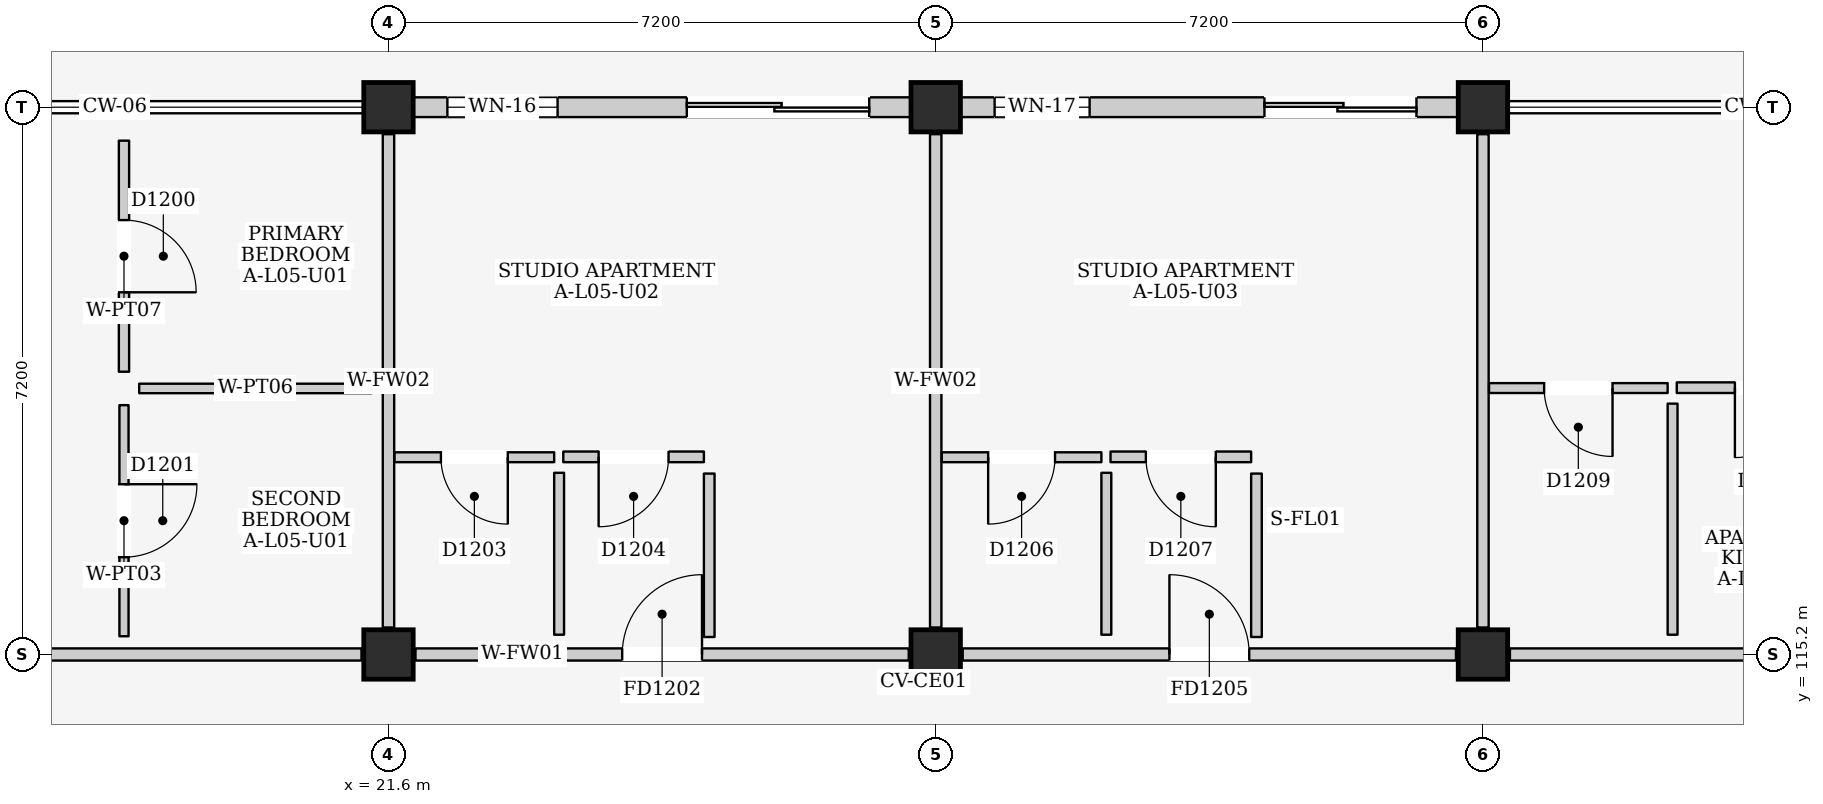
"""IFC4 building model, lengths in metres.
Left out: names, types, materials, properties, quantities, classifications, styles, units other than length and angle.
Written with IfcOpenShell. Run it as: python <this file> out.ifc"""

import sys

from ifc_helpers import new_model, si_unit, direction, frame, frame_2d, origin, origin_2d, place, context, subcontext, project, spatial, rectangle, extrude, element, fill, save


model = new_model("IFC4")
c1 = context("Model", 3, precision=1e-05, world=origin(), true_north=direction((0.0, 1.0)))
c2 = subcontext(c1, "Body", "Model", "MODEL_VIEW")
j1 = project(units=[si_unit("LENGTHUNIT", "METRE"), si_unit("PLANEANGLEUNIT", "RADIAN")], contexts=[c1])
p1 = place(None, origin())
s1 = spatial("IfcSite", under=j1, at=p1, CompositionType="ELEMENT")
p2 = place(p1, origin())
s2 = spatial("IfcBuilding", under=s1, at=p2, CompositionType="ELEMENT")
p3 = place(p2, frame((0.0, 0.0, 18.6)))
s3 = spatial("IfcBuildingStorey", under=s2, at=p3, CompositionType="ELEMENT", Elevation=18.6)
for number, where, z_axis, x_axis in (
    (1, (21.6, 115.2, 0.0), (0.0, 0.0, 1.0), (1.0, 0.0, 0.0)),
    (2, (21.6, 122.4, 0.0), (0.0, 0.0, 1.0), (1.0, 0.0, 0.0)),
    (3, (28.8, 115.2, 0.0), (0.0, 0.0, 1.0), (1.0, 0.0, 0.0)),
    (4, (28.8, 122.4, 0.0), (0.0, 0.0, 1.0), (1.0, 0.0, 0.0)),
    (5, (36.0, 115.2, 0.0), (0.0, 0.0, 1.0), (1.0, 0.0, 0.0)),
    (6, (36.0, 122.4, 0.0), (0.0, 0.0, 1.0), (1.0, 0.0, 0.0)),
):
    element("IfcColumn", number, at=place(p3, frame(where, z_axis=z_axis, x_axis=x_axis)), inside=s3, PredefinedType="COLUMN", context=c2, shape_type="SweptSolid", body=[
        extrude(rectangle(XDim=0.65, YDim=0.65, at=origin_2d()), origin(), (0.0, 0.0, 1.0), 3.3),
    ])
p4 = place(p3, frame((21.925, 122.4, 0.0), z_axis=(0.0, 0.0, 1.0), x_axis=(1.0, 0.0, 0.0)))
e7 = element("IfcWall", 7, at=p4, inside=s3, PredefinedType="ELEMENTEDWALL", context=c2, shape_type="SweptSolid", body=[
    extrude(rectangle(XDim=6.55, YDim=0.26, at=frame_2d((3.275, 0.0))), origin(), (0.0, 0.0, 1.0), 2.595),
])
p5 = place(p4, frame((3.6, 0.0, 0.0)))
e8 = element("IfcOpeningElement", 8, at=p5, cuts=e7, PredefinedType="OPENING", context=c2, shape_type="SweptSolid", body=[
    extrude(rectangle(XDim=2.4, YDim=2.12, at=frame_2d((1.2, 1.06))), frame((0.0, 0.145, 0.0), z_axis=(0.0, -1.0, 0.0), x_axis=(1.0, 0.0, 0.0)), (0.0, 0.0, 1.0), 0.29),
])
p6 = place(p4, frame((0.45, 0.0, 0.9)))
e9 = element("IfcOpeningElement", 9, at=p6, cuts=e7, PredefinedType="OPENING", context=c2, shape_type="SweptSolid", body=[
    extrude(rectangle(XDim=1.45, YDim=1.4, at=frame_2d((0.725, 0.7))), frame((0.0, 0.145, 0.0), z_axis=(0.0, -1.0, 0.0), x_axis=(1.0, 0.0, 0.0)), (0.0, 0.0, 1.0), 0.29),
])
p7 = place(p3, frame((29.125, 122.4, 0.0), z_axis=(0.0, 0.0, 1.0), x_axis=(1.0, 0.0, 0.0)))
e10 = element("IfcWall", 10, at=p7, inside=s3, PredefinedType="ELEMENTEDWALL", context=c2, shape_type="SweptSolid", body=[
    extrude(rectangle(XDim=6.55, YDim=0.26, at=frame_2d((3.275, 0.0))), origin(), (0.0, 0.0, 1.0), 2.595),
])
p8 = place(p7, frame((4.0, 0.0, 0.0)))
e11 = element("IfcOpeningElement", 11, at=p8, cuts=e10, PredefinedType="OPENING", context=c2, shape_type="SweptSolid", body=[
    extrude(rectangle(XDim=2.0, YDim=2.12, at=frame_2d((1.0, 1.06))), frame((0.0, 0.145, 0.0), z_axis=(0.0, -1.0, 0.0), x_axis=(1.0, 0.0, 0.0)), (0.0, 0.0, 1.0), 0.29),
])
p9 = place(p7, frame((0.45, 0.0, 0.9)))
e12 = element("IfcOpeningElement", 12, at=p9, cuts=e10, PredefinedType="OPENING", context=c2, shape_type="SweptSolid", body=[
    extrude(rectangle(XDim=1.25, YDim=1.3, at=frame_2d((0.625, 0.65))), frame((0.0, 0.145, 0.0), z_axis=(0.0, -1.0, 0.0), x_axis=(1.0, 0.0, 0.0)), (0.0, 0.0, 1.0), 0.29),
])
p10 = place(p3, frame((14.755, 115.2, 0.0), z_axis=(0.0, 0.0, 1.0), x_axis=(1.0, 0.0, 0.0)))
e13 = element("IfcWall", 13, at=p10, inside=s3, PredefinedType="PARTITIONING", context=c2, shape_type="SweptSolid", body=[
    extrude(rectangle(XDim=6.49, YDim=0.16, at=frame_2d((3.245, 0.0))), origin(), (0.0, 0.0, 1.0), 2.395),
])
p11 = place(p3, frame((21.6, 115.555, 0.0), z_axis=(0.0, 0.0, 1.0), x_axis=(0.0, 1.0, 0.0)))
e14 = element("IfcWall", 14, at=p11, inside=s3, PredefinedType="PARTITIONING", context=c2, shape_type="SweptSolid", body=[
    extrude(rectangle(XDim=6.49, YDim=0.15, at=frame_2d((3.245, 0.0))), origin(), (0.0, 0.0, 1.0), 2.545),
])
p12 = place(p3, frame((18.12, 118.92, 0.0), z_axis=(0.0, 0.0, 1.0), x_axis=(0.0, 1.0, 0.0)))
e15 = element("IfcWall", 15, at=p12, inside=s3, PredefinedType="PARTITIONING", context=c2, shape_type="SweptSolid", body=[
    extrude(rectangle(XDim=3.04, YDim=0.135, at=frame_2d((1.52, 0.0))), origin(), (0.0, 0.0, 1.0), 3.06),
])
p13 = place(p12, frame((1.045, 0.0, 0.0)))
e16 = element("IfcOpeningElement", 16, at=p13, cuts=e15, PredefinedType="OPENING", context=c2, shape_type="SweptSolid", body=[
    extrude(rectangle(XDim=0.95, YDim=2.15, at=frame_2d((0.475, 1.075))), frame((0.0, 0.083, 0.0), z_axis=(0.0, -1.0, 0.0), x_axis=(1.0, 0.0, 0.0)), (0.0, 0.0, 1.0), 0.165),
])
p14 = place(p3, frame((18.32, 118.7, 0.0), z_axis=(0.0, 0.0, 1.0), x_axis=(1.0, 0.0, 0.0)))
e17 = element("IfcWall", 17, at=p14, inside=s3, PredefinedType="PARTITIONING", context=c2, shape_type="SweptSolid", body=[
    extrude(rectangle(XDim=3.06, YDim=0.125, at=frame_2d((1.53, 0.0))), origin(), (0.0, 0.0, 1.0), 3.06),
])
p15 = place(p3, frame((18.12, 115.44, 0.0), z_axis=(0.0, 0.0, 1.0), x_axis=(0.0, 1.0, 0.0)))
e18 = element("IfcWall", 18, at=p15, inside=s3, PredefinedType="PARTITIONING", context=c2, shape_type="SweptSolid", body=[
    extrude(rectangle(XDim=3.04, YDim=0.12, at=frame_2d((1.52, 0.0))), origin(), (0.0, 0.0, 1.0), 3.06),
])
p16 = place(p15, frame((1.04, 0.0, 0.0)))
e19 = element("IfcOpeningElement", 19, at=p16, cuts=e18, PredefinedType="OPENING", context=c2, shape_type="SweptSolid", body=[
    extrude(rectangle(XDim=0.96, YDim=2.15, at=frame_2d((0.48, 1.075))), frame((0.0, 0.075, 0.0), z_axis=(0.0, -1.0, 0.0), x_axis=(1.0, 0.0, 0.0)), (0.0, 0.0, 1.0), 0.15),
])
p17 = place(p3, frame((21.955, 115.2, 0.0), z_axis=(0.0, 0.0, 1.0), x_axis=(1.0, 0.0, 0.0)))
e20 = element("IfcWall", 20, at=p17, inside=s3, PredefinedType="PARTITIONING", context=c2, shape_type="SweptSolid", body=[
    extrude(rectangle(XDim=6.49, YDim=0.16, at=frame_2d((3.245, 0.0))), origin(), (0.0, 0.0, 1.0), 2.395),
])
p18 = place(p17, frame((2.72, 0.0, 0.0)))
e21 = element("IfcOpeningElement", 21, at=p18, cuts=e20, PredefinedType="OPENING", context=c2, shape_type="SweptSolid", body=[
    extrude(rectangle(XDim=1.05, YDim=2.15, at=frame_2d((0.525, 1.075))), frame((0.0, 0.095, 0.0), z_axis=(0.0, -1.0, 0.0), x_axis=(1.0, 0.0, 0.0)), (0.0, 0.0, 1.0), 0.19),
])
p19 = place(p3, frame((28.8, 115.555, 0.0), z_axis=(0.0, 0.0, 1.0), x_axis=(0.0, 1.0, 0.0)))
e22 = element("IfcWall", 22, at=p19, inside=s3, PredefinedType="PARTITIONING", context=c2, shape_type="SweptSolid", body=[
    extrude(rectangle(XDim=6.49, YDim=0.15, at=frame_2d((3.245, 0.0))), origin(), (0.0, 0.0, 1.0), 2.545),
])
p20 = place(p3, frame((21.68, 117.795, 0.0), z_axis=(0.0, 0.0, 1.0), x_axis=(1.0, 0.0, 0.0)))
e23 = element("IfcWall", 23, at=p20, inside=s3, PredefinedType="PARTITIONING", context=c2, shape_type="SweptSolid", body=[
    extrude(rectangle(XDim=2.1, YDim=0.13, at=frame_2d((1.05, 0.0))), origin(), (0.0, 0.0, 1.0), 3.06),
])
p21 = place(p20, frame((0.61, 0.0, 0.0)))
e24 = element("IfcOpeningElement", 24, at=p21, cuts=e23, PredefinedType="OPENING", context=c2, shape_type="SweptSolid", body=[
    extrude(rectangle(XDim=0.88, YDim=2.1, at=frame_2d((0.44, 1.05))), frame((0.0, 0.08, 0.0), z_axis=(0.0, -1.0, 0.0), x_axis=(1.0, 0.0, 0.0)), (0.0, 0.0, 1.0), 0.16),
])
p22 = place(p3, frame((23.845, 115.46, 0.0), z_axis=(0.0, 0.0, 1.0), x_axis=(0.0, 1.0, 0.0)))
e25 = element("IfcWall", 25, at=p22, inside=s3, PredefinedType="PARTITIONING", context=c2, shape_type="SweptSolid", body=[
    extrude(rectangle(XDim=2.13, YDim=0.13, at=frame_2d((1.065, 0.0))), origin(), (0.0, 0.0, 1.0), 3.06),
])
p23 = place(p3, frame((23.9, 117.8, 0.0), z_axis=(0.0, 0.0, 1.0), x_axis=(1.0, 0.0, 0.0)))
e26 = element("IfcWall", 26, at=p23, inside=s3, PredefinedType="PARTITIONING", context=c2, shape_type="SweptSolid", body=[
    extrude(rectangle(XDim=1.85, YDim=0.14, at=frame_2d((0.925, 0.0))), origin(), (0.0, 0.0, 1.0), 3.06),
])
p24 = place(p23, frame((0.465, 0.0, 0.0)))
e27 = element("IfcOpeningElement", 27, at=p24, cuts=e26, PredefinedType="OPENING", context=c2, shape_type="SweptSolid", body=[
    extrude(rectangle(XDim=0.92, YDim=2.1, at=frame_2d((0.46, 1.05))), frame((0.0, 0.085, 0.0), z_axis=(0.0, -1.0, 0.0), x_axis=(1.0, 0.0, 0.0)), (0.0, 0.0, 1.0), 0.17),
])
p25 = place(p3, frame((25.82, 115.43, 0.0), z_axis=(0.0, 0.0, 1.0), x_axis=(0.0, 1.0, 0.0)))
e28 = element("IfcWall", 28, at=p25, inside=s3, PredefinedType="PARTITIONING", context=c2, shape_type="SweptSolid", body=[
    extrude(rectangle(XDim=2.15, YDim=0.14, at=frame_2d((1.075, 0.0))), origin(), (0.0, 0.0, 1.0), 3.06),
])
p26 = place(p3, frame((29.155, 115.2, 0.0), z_axis=(0.0, 0.0, 1.0), x_axis=(1.0, 0.0, 0.0)))
e29 = element("IfcWall", 29, at=p26, inside=s3, PredefinedType="PARTITIONING", context=c2, shape_type="SweptSolid", body=[
    extrude(rectangle(XDim=6.49, YDim=0.16, at=frame_2d((3.245, 0.0))), origin(), (0.0, 0.0, 1.0), 2.395),
])
p27 = place(p26, frame((2.72, 0.0, 0.0)))
e30 = element("IfcOpeningElement", 30, at=p27, cuts=e29, PredefinedType="OPENING", context=c2, shape_type="SweptSolid", body=[
    extrude(rectangle(XDim=1.05, YDim=2.15, at=frame_2d((0.525, 1.075))), frame((0.0, 0.095, 0.0), z_axis=(0.0, -1.0, 0.0), x_axis=(1.0, 0.0, 0.0)), (0.0, 0.0, 1.0), 0.19),
])
p28 = place(p3, frame((36.0, 115.555, 0.0), z_axis=(0.0, 0.0, 1.0), x_axis=(0.0, 1.0, 0.0)))
e31 = element("IfcWall", 31, at=p28, inside=s3, PredefinedType="PARTITIONING", context=c2, shape_type="SweptSolid", body=[
    extrude(rectangle(XDim=6.49, YDim=0.15, at=frame_2d((3.245, 0.0))), origin(), (0.0, 0.0, 1.0), 2.545),
])
p29 = place(p3, frame((28.88, 117.795, 0.0), z_axis=(0.0, 0.0, 1.0), x_axis=(1.0, 0.0, 0.0)))
e32 = element("IfcWall", 32, at=p29, inside=s3, PredefinedType="PARTITIONING", context=c2, shape_type="SweptSolid", body=[
    extrude(rectangle(XDim=2.1, YDim=0.13, at=frame_2d((1.05, 0.0))), origin(), (0.0, 0.0, 1.0), 3.06),
])
p30 = place(p29, frame((0.61, 0.0, 0.0)))
e33 = element("IfcOpeningElement", 33, at=p30, cuts=e32, PredefinedType="OPENING", context=c2, shape_type="SweptSolid", body=[
    extrude(rectangle(XDim=0.88, YDim=2.1, at=frame_2d((0.44, 1.05))), frame((0.0, 0.08, 0.0), z_axis=(0.0, -1.0, 0.0), x_axis=(1.0, 0.0, 0.0)), (0.0, 0.0, 1.0), 0.16),
])
p31 = place(p3, frame((31.045, 115.46, 0.0), z_axis=(0.0, 0.0, 1.0), x_axis=(0.0, 1.0, 0.0)))
e34 = element("IfcWall", 34, at=p31, inside=s3, PredefinedType="PARTITIONING", context=c2, shape_type="SweptSolid", body=[
    extrude(rectangle(XDim=2.13, YDim=0.13, at=frame_2d((1.065, 0.0))), origin(), (0.0, 0.0, 1.0), 3.06),
])
p32 = place(p3, frame((31.1, 117.8, 0.0), z_axis=(0.0, 0.0, 1.0), x_axis=(1.0, 0.0, 0.0)))
e35 = element("IfcWall", 35, at=p32, inside=s3, PredefinedType="PARTITIONING", context=c2, shape_type="SweptSolid", body=[
    extrude(rectangle(XDim=1.85, YDim=0.14, at=frame_2d((0.925, 0.0))), origin(), (0.0, 0.0, 1.0), 3.06),
])
p33 = place(p32, frame((0.465, 0.0, 0.0)))
e36 = element("IfcOpeningElement", 36, at=p33, cuts=e35, PredefinedType="OPENING", context=c2, shape_type="SweptSolid", body=[
    extrude(rectangle(XDim=0.92, YDim=2.1, at=frame_2d((0.46, 1.05))), frame((0.0, 0.085, 0.0), z_axis=(0.0, -1.0, 0.0), x_axis=(1.0, 0.0, 0.0)), (0.0, 0.0, 1.0), 0.17),
])
p34 = place(p3, frame((33.02, 115.43, 0.0), z_axis=(0.0, 0.0, 1.0), x_axis=(0.0, 1.0, 0.0)))
e37 = element("IfcWall", 37, at=p34, inside=s3, PredefinedType="PARTITIONING", context=c2, shape_type="SweptSolid", body=[
    extrude(rectangle(XDim=2.15, YDim=0.14, at=frame_2d((1.075, 0.0))), origin(), (0.0, 0.0, 1.0), 3.06),
])
p35 = place(p3, frame((36.355, 115.2, 0.0), z_axis=(0.0, 0.0, 1.0), x_axis=(1.0, 0.0, 0.0)))
e38 = element("IfcWall", 38, at=p35, inside=s3, PredefinedType="PARTITIONING", context=c2, shape_type="SweptSolid", body=[
    extrude(rectangle(XDim=6.49, YDim=0.16, at=frame_2d((3.245, 0.0))), origin(), (0.0, 0.0, 1.0), 2.395),
])
p36 = place(p35, frame((5.22, 0.0, 0.0)))
e39 = element("IfcOpeningElement", 39, at=p36, cuts=e38, PredefinedType="OPENING", context=c2, shape_type="SweptSolid", body=[
    extrude(rectangle(XDim=1.05, YDim=2.15, at=frame_2d((0.525, 1.075))), frame((0.0, 0.095, 0.0), z_axis=(0.0, -1.0, 0.0), x_axis=(1.0, 0.0, 0.0)), (0.0, 0.0, 1.0), 0.19),
])
p37 = place(p3, frame((36.08, 118.705, 0.0), z_axis=(0.0, 0.0, 1.0), x_axis=(1.0, 0.0, 0.0)))
e40 = element("IfcWall", 40, at=p37, inside=s3, PredefinedType="PARTITIONING", context=c2, shape_type="SweptSolid", body=[
    extrude(rectangle(XDim=2.35, YDim=0.13, at=frame_2d((1.175, 0.0))), origin(), (0.0, 0.0, 1.0), 3.06),
])
p38 = place(p37, frame((0.725, 0.0, 0.0)))
e41 = element("IfcOpeningElement", 41, at=p38, cuts=e40, PredefinedType="OPENING", context=c2, shape_type="SweptSolid", body=[
    extrude(rectangle(XDim=0.9, YDim=2.1, at=frame_2d((0.45, 1.05))), frame((0.0, 0.08, 0.0), z_axis=(0.0, -1.0, 0.0), x_axis=(1.0, 0.0, 0.0)), (0.0, 0.0, 1.0), 0.16),
])
p39 = place(p3, frame((38.495, 115.46, 0.0), z_axis=(0.0, 0.0, 1.0), x_axis=(0.0, 1.0, 0.0)))
e42 = element("IfcWall", 42, at=p39, inside=s3, PredefinedType="PARTITIONING", context=c2, shape_type="SweptSolid", body=[
    extrude(rectangle(XDim=3.04, YDim=0.13, at=frame_2d((1.52, 0.0))), origin(), (0.0, 0.0, 1.0), 3.06),
])
p40 = place(p3, frame((38.55, 118.71, 0.0), z_axis=(0.0, 0.0, 1.0), x_axis=(1.0, 0.0, 0.0)))
e43 = element("IfcWall", 43, at=p40, inside=s3, PredefinedType="PARTITIONING", context=c2, shape_type="SweptSolid", body=[
    extrude(rectangle(XDim=2.45, YDim=0.14, at=frame_2d((1.225, 0.0))), origin(), (0.0, 0.0, 1.0), 3.06),
])
p41 = place(p40, frame((0.765, 0.0, 0.0)))
e44 = element("IfcOpeningElement", 44, at=p41, cuts=e43, PredefinedType="OPENING", context=c2, shape_type="SweptSolid", body=[
    extrude(rectangle(XDim=0.92, YDim=2.1, at=frame_2d((0.46, 1.05))), frame((0.0, 0.085, 0.0), z_axis=(0.0, -1.0, 0.0), x_axis=(1.0, 0.0, 0.0)), (0.0, 0.0, 1.0), 0.17),
])
p42 = place(p5, frame((2.4, 0.0, 0.0), z_axis=(0.0, 0.0, 1.0), x_axis=(-1.0, 0.0, 0.0)))
e45 = element("IfcDoor", 45, at=p42, inside=s3, OperationType="DOUBLE_DOOR_SLIDING", PredefinedType="DOOR", context=c2, shape_type="SweptSolid", body=[
    extrude(rectangle(XDim=2.4, YDim=2.12, at=frame_2d((1.2, 1.06))), frame((0.0, 0.025, 0.0), z_axis=(0.0, -1.0, 0.0), x_axis=(1.0, 0.0, 0.0)), (0.0, 0.0, 1.0), 0.05),
])
fill(e8, e45)
p43 = place(p6, origin())
e46 = element("IfcWindow", 46, at=p43, inside=s3, PartitioningType="DOUBLE_PANEL_VERTICAL", PredefinedType="WINDOW", context=c2, shape_type="SweptSolid", body=[
    extrude(rectangle(XDim=1.45, YDim=1.4, at=frame_2d((0.725, 0.7))), frame((0.0, 0.03, 0.0), z_axis=(0.0, -1.0, 0.0), x_axis=(1.0, 0.0, 0.0)), (0.0, 0.0, 1.0), 0.06),
])
fill(e9, e46)
p44 = place(p8, frame((2.0, 0.0, 0.0), z_axis=(0.0, 0.0, 1.0), x_axis=(-1.0, 0.0, 0.0)))
e47 = element("IfcDoor", 47, at=p44, inside=s3, OperationType="DOUBLE_DOOR_SLIDING", PredefinedType="DOOR", context=c2, shape_type="SweptSolid", body=[
    extrude(rectangle(XDim=2.0, YDim=2.12, at=frame_2d((1.0, 1.06))), frame((0.0, 0.025, 0.0), z_axis=(0.0, -1.0, 0.0), x_axis=(1.0, 0.0, 0.0)), (0.0, 0.0, 1.0), 0.05),
])
fill(e11, e47)
p45 = place(p9, origin())
e48 = element("IfcWindow", 48, at=p45, inside=s3, PartitioningType="SINGLE_PANEL", PredefinedType="WINDOW", context=c2, shape_type="SweptSolid", body=[
    extrude(rectangle(XDim=1.25, YDim=1.3, at=frame_2d((0.625, 0.65))), frame((0.0, 0.03, 0.0), z_axis=(0.0, -1.0, 0.0), x_axis=(1.0, 0.0, 0.0)), (0.0, 0.0, 1.0), 0.06),
])
fill(e12, e48)
p46 = place(p13, frame((0.95, 0.0, 0.0), z_axis=(0.0, 0.0, 1.0), x_axis=(-1.0, 0.0, 0.0)))
e49 = element("IfcDoor", 49, at=p46, inside=s3, OperationType="SINGLE_SWING_RIGHT", PredefinedType="DOOR", context=c2, shape_type="SweptSolid", body=[
    extrude(rectangle(XDim=0.95, YDim=2.15, at=frame_2d((0.475, 1.075))), frame((0.0, 0.025, 0.0), z_axis=(0.0, -1.0, 0.0), x_axis=(1.0, 0.0, 0.0)), (0.0, 0.0, 1.0), 0.05),
])
fill(e16, e49)
p47 = place(p16, frame((0.96, 0.0, 0.0), z_axis=(0.0, 0.0, 1.0), x_axis=(-1.0, 0.0, 0.0)))
e50 = element("IfcDoor", 50, at=p47, inside=s3, OperationType="SINGLE_SWING_LEFT", PredefinedType="DOOR", context=c2, shape_type="SweptSolid", body=[
    extrude(rectangle(XDim=0.96, YDim=2.15, at=frame_2d((0.48, 1.075))), frame((0.0, 0.025, 0.0), z_axis=(0.0, -1.0, 0.0), x_axis=(1.0, 0.0, 0.0)), (0.0, 0.0, 1.0), 0.05),
])
fill(e19, e50)
p48 = place(p18, origin())
e51 = element("IfcDoor", 51, at=p48, inside=s3, OperationType="SINGLE_SWING_RIGHT", PredefinedType="DOOR", context=c2, shape_type="SweptSolid", body=[
    extrude(rectangle(XDim=1.05, YDim=2.15, at=frame_2d((0.525, 1.075))), frame((0.0, 0.025, 0.0), z_axis=(0.0, -1.0, 0.0), x_axis=(1.0, 0.0, 0.0)), (0.0, 0.0, 1.0), 0.05),
])
fill(e21, e51)
p49 = place(p21, frame((0.88, 0.0, 0.0), z_axis=(0.0, 0.0, 1.0), x_axis=(-1.0, 0.0, 0.0)))
e52 = element("IfcDoor", 52, at=p49, inside=s3, OperationType="SINGLE_SWING_LEFT", PredefinedType="DOOR", context=c2, shape_type="SweptSolid", body=[
    extrude(rectangle(XDim=0.88, YDim=2.1, at=frame_2d((0.44, 1.05))), frame((0.0, 0.025, 0.0), z_axis=(0.0, -1.0, 0.0), x_axis=(1.0, 0.0, 0.0)), (0.0, 0.0, 1.0), 0.05),
])
fill(e24, e52)
p50 = place(p24, frame((0.92, 0.0, 0.0), z_axis=(0.0, 0.0, 1.0), x_axis=(-1.0, 0.0, 0.0)))
e53 = element("IfcDoor", 53, at=p50, inside=s3, OperationType="SINGLE_SWING_RIGHT", PredefinedType="DOOR", context=c2, shape_type="SweptSolid", body=[
    extrude(rectangle(XDim=0.92, YDim=2.1, at=frame_2d((0.46, 1.05))), frame((0.0, 0.025, 0.0), z_axis=(0.0, -1.0, 0.0), x_axis=(1.0, 0.0, 0.0)), (0.0, 0.0, 1.0), 0.05),
])
fill(e27, e53)
p51 = place(p27, origin())
e54 = element("IfcDoor", 54, at=p51, inside=s3, OperationType="SINGLE_SWING_LEFT", PredefinedType="DOOR", context=c2, shape_type="SweptSolid", body=[
    extrude(rectangle(XDim=1.05, YDim=2.15, at=frame_2d((0.525, 1.075))), frame((0.0, 0.025, 0.0), z_axis=(0.0, -1.0, 0.0), x_axis=(1.0, 0.0, 0.0)), (0.0, 0.0, 1.0), 0.05),
])
fill(e30, e54)
p52 = place(p30, frame((0.88, 0.0, 0.0), z_axis=(0.0, 0.0, 1.0), x_axis=(-1.0, 0.0, 0.0)))
e55 = element("IfcDoor", 55, at=p52, inside=s3, OperationType="SINGLE_SWING_RIGHT", PredefinedType="DOOR", context=c2, shape_type="SweptSolid", body=[
    extrude(rectangle(XDim=0.88, YDim=2.1, at=frame_2d((0.44, 1.05))), frame((0.0, 0.025, 0.0), z_axis=(0.0, -1.0, 0.0), x_axis=(1.0, 0.0, 0.0)), (0.0, 0.0, 1.0), 0.05),
])
fill(e33, e55)
p53 = place(p33, frame((0.92, 0.0, 0.0), z_axis=(0.0, 0.0, 1.0), x_axis=(-1.0, 0.0, 0.0)))
e56 = element("IfcDoor", 56, at=p53, inside=s3, OperationType="SINGLE_SWING_LEFT", PredefinedType="DOOR", context=c2, shape_type="SweptSolid", body=[
    extrude(rectangle(XDim=0.92, YDim=2.1, at=frame_2d((0.46, 1.05))), frame((0.0, 0.025, 0.0), z_axis=(0.0, -1.0, 0.0), x_axis=(1.0, 0.0, 0.0)), (0.0, 0.0, 1.0), 0.05),
])
fill(e36, e56)
p54 = place(p38, frame((0.9, 0.0, 0.0), z_axis=(0.0, 0.0, 1.0), x_axis=(-1.0, 0.0, 0.0)))
e57 = element("IfcDoor", 57, at=p54, inside=s3, OperationType="SINGLE_SWING_LEFT", PredefinedType="DOOR", context=c2, shape_type="SweptSolid", body=[
    extrude(rectangle(XDim=0.9, YDim=2.1, at=frame_2d((0.45, 1.05))), frame((0.0, 0.025, 0.0), z_axis=(0.0, -1.0, 0.0), x_axis=(1.0, 0.0, 0.0)), (0.0, 0.0, 1.0), 0.05),
])
fill(e41, e57)
p55 = place(p41, frame((0.92, 0.0, 0.0), z_axis=(0.0, 0.0, 1.0), x_axis=(-1.0, 0.0, 0.0)))
e58 = element("IfcDoor", 58, at=p55, inside=s3, OperationType="SINGLE_SWING_RIGHT", PredefinedType="DOOR", context=c2, shape_type="SweptSolid", body=[
    extrude(rectangle(XDim=0.92, YDim=2.1, at=frame_2d((0.46, 1.05))), frame((0.0, 0.025, 0.0), z_axis=(0.0, -1.0, 0.0), x_axis=(1.0, 0.0, 0.0)), (0.0, 0.0, 1.0), 0.05),
])
fill(e44, e58)
save(model, sys.argv[1])
